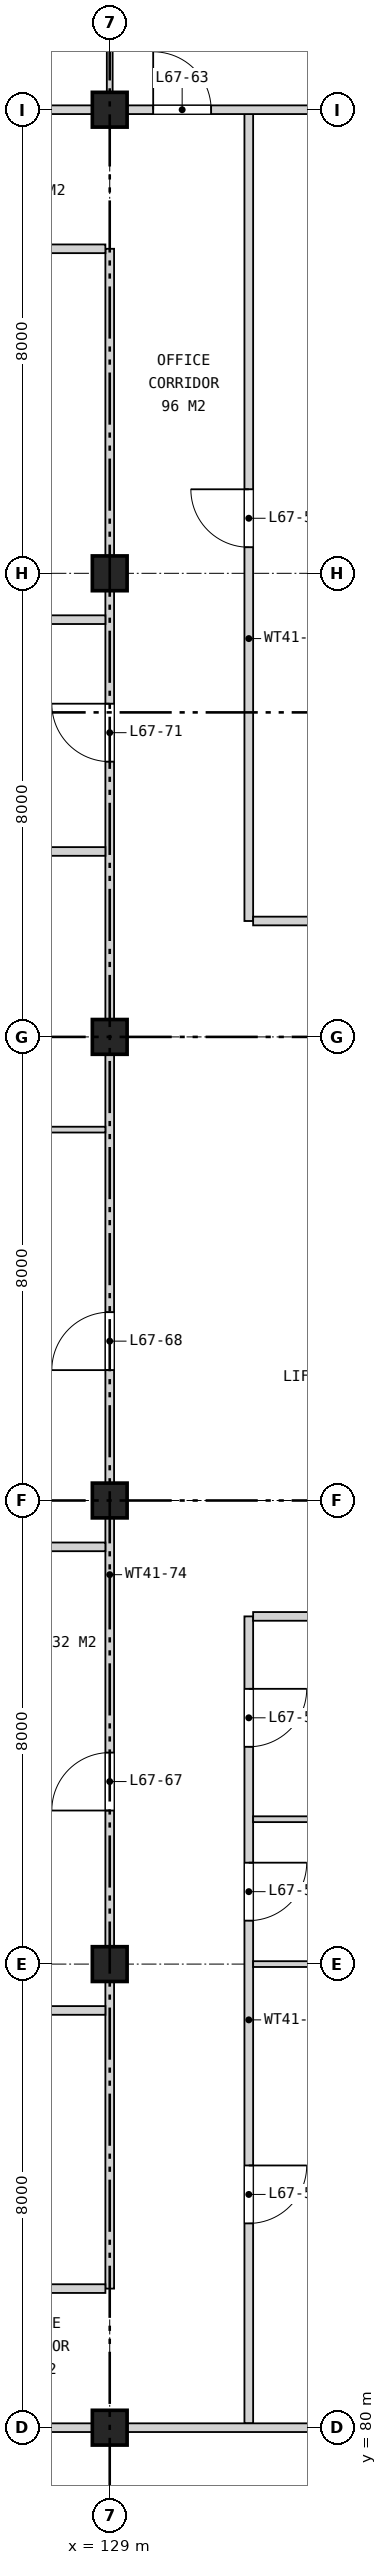
"""IFC4 building model, lengths in metres.
Left out: names, types, materials, properties, quantities, classifications, styles, units other than length and angle.
Written with IfcOpenShell. Run it as: python <this file> out.ifc"""

import sys

from ifc_helpers import new_model, si_unit, direction, frame, frame_2d, origin, origin_2d, place, context, subcontext, project, spatial, rectangle, extrude, element, fill, save


model = new_model("IFC4")
c1 = context("Model", 3, precision=1e-05, world=origin(), true_north=direction((0.0, 1.0)))
c2 = subcontext(c1, "Body", "Model", "MODEL_VIEW")
j1 = project(units=[si_unit("LENGTHUNIT", "METRE"), si_unit("PLANEANGLEUNIT", "RADIAN")], contexts=[c1])
p1 = place(None, origin())
s1 = spatial("IfcSite", under=j1, at=p1, CompositionType="ELEMENT")
p2 = place(p1, origin())
s2 = spatial("IfcBuilding", under=s1, at=p2, CompositionType="ELEMENT")
p3 = place(p2, frame((0.0, 0.0, 311.3)))
s3 = spatial("IfcBuildingStorey", under=s2, at=p3, CompositionType="ELEMENT", Elevation=311.3)
for number, where, z_axis, x_axis in (
    (1, (129.0, 80.0, 0.0), (0.0, 0.0, 1.0), (1.0, 0.0, 0.0)),
    (2, (129.0, 88.0, 0.0), (0.0, 0.0, 1.0), (1.0, 0.0, 0.0)),
    (3, (129.0, 96.0, 0.0), (0.0, 0.0, 1.0), (1.0, 0.0, 0.0)),
    (4, (129.0, 104.0, 0.0), (0.0, 0.0, 1.0), (1.0, 0.0, 0.0)),
    (5, (129.0, 112.0, 0.0), (0.0, 0.0, 1.0), (1.0, 0.0, 0.0)),
    (6, (129.0, 120.0, 0.0), (0.0, 0.0, 1.0), (1.0, 0.0, 0.0)),
):
    element("IfcColumn", number, at=place(p3, frame(where, z_axis=z_axis, x_axis=x_axis)), inside=s3, PredefinedType="COLUMN", context=c2, shape_type="SweptSolid", body=[
        extrude(rectangle(XDim=0.6, YDim=0.6, at=origin_2d()), origin(), (0.0, 0.0, 1.0), 4.2),
    ])
p4 = place(p3, frame((129.0, 82.4, 0.0), z_axis=(0.0, 0.0, 1.0), x_axis=(0.0, 1.0, 0.0)))
e7 = element("IfcWall", 7, at=p4, inside=s3, PredefinedType="PARTITIONING", context=c2, shape_type="SweptSolid", body=[
    extrude(rectangle(XDim=35.2, YDim=0.15, at=frame_2d((17.6, 0.0))), origin(), (0.0, 0.0, 1.0), 3.443),
])
p5 = place(p4, frame((8.25, 0.0, 0.0)))
e8 = element("IfcOpeningElement", 8, at=p5, cuts=e7, PredefinedType="OPENING", context=c2, shape_type="SweptSolid", body=[
    extrude(rectangle(XDim=1.0, YDim=2.1, at=frame_2d((0.5, 1.05))), frame((0.0, 0.085, 0.0), z_axis=(0.0, -1.0, 0.0), x_axis=(1.0, 0.0, 0.0)), (0.0, 0.0, 1.0), 0.17),
])
p6 = place(p4, frame((15.85, 0.0, 0.0)))
e9 = element("IfcOpeningElement", 9, at=p6, cuts=e7, PredefinedType="OPENING", context=c2, shape_type="SweptSolid", body=[
    extrude(rectangle(XDim=1.0, YDim=2.1, at=frame_2d((0.5, 1.05))), frame((0.0, 0.085, 0.0), z_axis=(0.0, -1.0, 0.0), x_axis=(1.0, 0.0, 0.0)), (0.0, 0.0, 1.0), 0.17),
])
p7 = place(p4, frame((26.35, 0.0, 0.0)))
e10 = element("IfcOpeningElement", 10, at=p7, cuts=e7, PredefinedType="OPENING", context=c2, shape_type="SweptSolid", body=[
    extrude(rectangle(XDim=1.0, YDim=2.1, at=frame_2d((0.5, 1.05))), frame((0.0, 0.085, 0.0), z_axis=(0.0, -1.0, 0.0), x_axis=(1.0, 0.0, 0.0)), (0.0, 0.0, 1.0), 0.17),
])
p8 = place(p3, frame((129.0, 120.075, 0.0), z_axis=(0.0, 0.0, 1.0), x_axis=(0.0, 1.0, 0.0)))
e11 = element("IfcWall", 11, at=p8, inside=s3, PredefinedType="PARTITIONING", context=c2, shape_type="SweptSolid", body=[
    extrude(rectangle(XDim=8.145, YDim=0.1, at=frame_2d((4.073, 0.0))), origin(), (0.0, 0.0, 1.0), 3.443),
])
p9 = place(p3, frame((131.4, 80.075, 0.0), z_axis=(0.0, 0.0, 1.0), x_axis=(0.0, 1.0, 0.0)))
e12 = element("IfcWall", 12, at=p9, inside=s3, PredefinedType="PARTITIONING", context=c2, shape_type="SweptSolid", body=[
    extrude(rectangle(XDim=13.925, YDim=0.15, at=frame_2d((6.962, 0.0))), origin(), (0.0, 0.0, 1.0), 3.443),
])
p10 = place(p9, frame((11.675, 0.0, 0.0)))
e13 = element("IfcOpeningElement", 13, at=p10, cuts=e12, PredefinedType="OPENING", context=c2, shape_type="SweptSolid", body=[
    extrude(rectangle(XDim=1.0, YDim=2.1, at=frame_2d((0.5, 1.05))), frame((0.0, 0.085, 0.0), z_axis=(0.0, -1.0, 0.0), x_axis=(1.0, 0.0, 0.0)), (0.0, 0.0, 1.0), 0.17),
])
p11 = place(p9, frame((8.675, 0.0, 0.0)))
e14 = element("IfcOpeningElement", 14, at=p11, cuts=e12, PredefinedType="OPENING", context=c2, shape_type="SweptSolid", body=[
    extrude(rectangle(XDim=1.0, YDim=2.1, at=frame_2d((0.5, 1.05))), frame((0.0, 0.085, 0.0), z_axis=(0.0, -1.0, 0.0), x_axis=(1.0, 0.0, 0.0)), (0.0, 0.0, 1.0), 0.17),
])
p12 = place(p9, frame((3.45, 0.0, 0.0)))
e15 = element("IfcOpeningElement", 15, at=p12, cuts=e12, PredefinedType="OPENING", context=c2, shape_type="SweptSolid", body=[
    extrude(rectangle(XDim=1.0, YDim=2.1, at=frame_2d((0.5, 1.05))), frame((0.0, 0.085, 0.0), z_axis=(0.0, -1.0, 0.0), x_axis=(1.0, 0.0, 0.0)), (0.0, 0.0, 1.0), 0.17),
])
p13 = place(p3, frame((131.4, 106.0, 0.0), z_axis=(0.0, 0.0, 1.0), x_axis=(0.0, 1.0, 0.0)))
e16 = element("IfcWall", 16, at=p13, inside=s3, PredefinedType="PARTITIONING", context=c2, shape_type="SweptSolid", body=[
    extrude(rectangle(XDim=13.925, YDim=0.15, at=frame_2d((6.962, 0.0))), origin(), (0.0, 0.0, 1.0), 3.443),
])
p14 = place(p13, frame((6.45, 0.0, 0.0)))
e17 = element("IfcOpeningElement", 17, at=p14, cuts=e16, PredefinedType="OPENING", context=c2, shape_type="SweptSolid", body=[
    extrude(rectangle(XDim=1.0, YDim=2.1, at=frame_2d((0.5, 1.05))), frame((0.0, 0.085, 0.0), z_axis=(0.0, -1.0, 0.0), x_axis=(1.0, 0.0, 0.0)), (0.0, 0.0, 1.0), 0.17),
])
p15 = place(p3, frame((112.78, 80.0, 0.0), z_axis=(0.0, 0.0, 1.0), x_axis=(1.0, 0.0, 0.0)))
e18 = element("IfcWall", 18, at=p15, inside=s3, PredefinedType="PARTITIONING", context=c2, shape_type="SweptSolid", body=[
    extrude(rectangle(XDim=24.44, YDim=0.15, at=frame_2d((12.22, 0.0))), origin(), (0.0, 0.0, 1.0), 3.443),
])
p16 = place(p15, frame((11.27, 0.0, 0.0)))
e19 = element("IfcOpeningElement", 19, at=p16, cuts=e18, PredefinedType="OPENING", context=c2, shape_type="SweptSolid", body=[
    extrude(rectangle(XDim=1.8, YDim=2.1, at=frame_2d((0.9, 1.05))), frame((0.0, 0.085, 0.0), z_axis=(0.0, -1.0, 0.0), x_axis=(1.0, 0.0, 0.0)), (0.0, 0.0, 1.0), 0.17),
])
p17 = place(p3, frame((121.075, 82.4, 0.0), z_axis=(0.0, 0.0, 1.0), x_axis=(1.0, 0.0, 0.0)))
e20 = element("IfcWall", 20, at=p17, inside=s3, PredefinedType="PARTITIONING", context=c2, shape_type="SweptSolid", body=[
    extrude(rectangle(XDim=7.85, YDim=0.15, at=frame_2d((3.925, 0.0))), origin(), (0.0, 0.0, 1.0), 3.443),
])
p18 = place(p17, frame((3.45, 0.0, 0.0)))
e21 = element("IfcOpeningElement", 21, at=p18, cuts=e20, PredefinedType="OPENING", context=c2, shape_type="SweptSolid", body=[
    extrude(rectangle(XDim=1.0, YDim=2.1, at=frame_2d((0.5, 1.05))), frame((0.0, 0.085, 0.0), z_axis=(0.0, -1.0, 0.0), x_axis=(1.0, 0.0, 0.0)), (0.0, 0.0, 1.0), 0.17),
])
p19 = place(p3, frame((121.075, 87.2, 0.0), z_axis=(0.0, 0.0, 1.0), x_axis=(1.0, 0.0, 0.0)))
e22 = element("IfcWall", 22, at=p19, inside=s3, PredefinedType="PARTITIONING", context=c2, shape_type="SweptSolid", body=[
    extrude(rectangle(XDim=7.85, YDim=0.15, at=frame_2d((3.925, 0.0))), origin(), (0.0, 0.0, 1.0), 3.443),
])
for number, where, z_axis, x_axis in (
    (23, (131.475, 88.0, 0.0), (0.0, 0.0, 1.0), (1.0, 0.0, 0.0)),
    (24, (131.475, 90.5, 0.0), (0.0, 0.0, 1.0), (1.0, 0.0, 0.0)),
):
    element("IfcWall", number, at=place(p3, frame(where, z_axis=z_axis, x_axis=x_axis)), inside=s3, PredefinedType="PARTITIONING", context=c2, shape_type="SweptSolid", body=[
        extrude(rectangle(XDim=5.525, YDim=0.1, at=frame_2d((2.762, 0.0))), origin(), (0.0, 0.0, 1.0), 3.443),
    ])
p20 = place(p3, frame((131.475, 94.0, 0.0), z_axis=(0.0, 0.0, 1.0), x_axis=(1.0, 0.0, 0.0)))
e25 = element("IfcWall", 25, at=p20, inside=s3, PredefinedType="PARTITIONING", context=c2, shape_type="SweptSolid", body=[
    extrude(rectangle(XDim=5.525, YDim=0.15, at=frame_2d((2.762, 0.0))), origin(), (0.0, 0.0, 1.0), 3.443),
])
p21 = place(p3, frame((121.075, 95.2, 0.0), z_axis=(0.0, 0.0, 1.0), x_axis=(1.0, 0.0, 0.0)))
e26 = element("IfcWall", 26, at=p21, inside=s3, PredefinedType="PARTITIONING", context=c2, shape_type="SweptSolid", body=[
    extrude(rectangle(XDim=7.85, YDim=0.15, at=frame_2d((3.925, 0.0))), origin(), (0.0, 0.0, 1.0), 3.443),
])
p22 = place(p3, frame((121.075, 102.4, 0.0), z_axis=(0.0, 0.0, 1.0), x_axis=(1.0, 0.0, 0.0)))
e27 = element("IfcWall", 27, at=p22, inside=s3, PredefinedType="PARTITIONING", context=c2, shape_type="SweptSolid", body=[
    extrude(rectangle(XDim=7.85, YDim=0.1, at=frame_2d((3.925, 0.0))), origin(), (0.0, 0.0, 1.0), 3.443),
])
p23 = place(p3, frame((131.475, 106.0, 0.0), z_axis=(0.0, 0.0, 1.0), x_axis=(1.0, 0.0, 0.0)))
e28 = element("IfcWall", 28, at=p23, inside=s3, PredefinedType="PARTITIONING", context=c2, shape_type="SweptSolid", body=[
    extrude(rectangle(XDim=5.525, YDim=0.15, at=frame_2d((2.762, 0.0))), origin(), (0.0, 0.0, 1.0), 3.443),
])
for number, where, z_axis, x_axis in (
    (29, (121.075, 107.2, 0.0), (0.0, 0.0, 1.0), (1.0, 0.0, 0.0)),
    (30, (121.075, 111.2, 0.0), (0.0, 0.0, 1.0), (1.0, 0.0, 0.0)),
):
    element("IfcWall", number, at=place(p3, frame(where, z_axis=z_axis, x_axis=x_axis)), inside=s3, PredefinedType="PARTITIONING", context=c2, shape_type="SweptSolid", body=[
        extrude(rectangle(XDim=7.85, YDim=0.15, at=frame_2d((3.925, 0.0))), origin(), (0.0, 0.0, 1.0), 3.443),
    ])
p24 = place(p3, frame((121.075, 117.6, 0.0), z_axis=(0.0, 0.0, 1.0), x_axis=(1.0, 0.0, 0.0)))
e31 = element("IfcWall", 31, at=p24, inside=s3, PredefinedType="PARTITIONING", context=c2, shape_type="SweptSolid", body=[
    extrude(rectangle(XDim=7.85, YDim=0.15, at=frame_2d((3.925, 0.0))), origin(), (0.0, 0.0, 1.0), 3.443),
])
p25 = place(p24, frame((3.45, 0.0, 0.0)))
e32 = element("IfcOpeningElement", 32, at=p25, cuts=e31, PredefinedType="OPENING", context=c2, shape_type="SweptSolid", body=[
    extrude(rectangle(XDim=1.0, YDim=2.1, at=frame_2d((0.5, 1.05))), frame((0.0, 0.085, 0.0), z_axis=(0.0, -1.0, 0.0), x_axis=(1.0, 0.0, 0.0)), (0.0, 0.0, 1.0), 0.17),
])
p26 = place(p3, frame((112.78, 120.0, 0.0), z_axis=(0.0, 0.0, 1.0), x_axis=(1.0, 0.0, 0.0)))
e33 = element("IfcWall", 33, at=p26, inside=s3, PredefinedType="PARTITIONING", context=c2, shape_type="SweptSolid", body=[
    extrude(rectangle(XDim=24.44, YDim=0.15, at=frame_2d((12.22, 0.0))), origin(), (0.0, 0.0, 1.0), 3.443),
])
p27 = place(p26, frame((6.47, 0.0, 0.0)))
e34 = element("IfcOpeningElement", 34, at=p27, cuts=e33, PredefinedType="OPENING", context=c2, shape_type="SweptSolid", body=[
    extrude(rectangle(XDim=1.0, YDim=2.1, at=frame_2d((0.5, 1.05))), frame((0.0, 0.085, 0.0), z_axis=(0.0, -1.0, 0.0), x_axis=(1.0, 0.0, 0.0)), (0.0, 0.0, 1.0), 0.17),
])
p28 = place(p26, frame((11.67, 0.0, 0.0)))
e35 = element("IfcOpeningElement", 35, at=p28, cuts=e33, PredefinedType="OPENING", context=c2, shape_type="SweptSolid", body=[
    extrude(rectangle(XDim=1.0, YDim=2.1, at=frame_2d((0.5, 1.05))), frame((0.0, 0.085, 0.0), z_axis=(0.0, -1.0, 0.0), x_axis=(1.0, 0.0, 0.0)), (0.0, 0.0, 1.0), 0.17),
])
p29 = place(p26, frame((16.97, 0.0, 0.0)))
e36 = element("IfcOpeningElement", 36, at=p29, cuts=e33, PredefinedType="OPENING", context=c2, shape_type="SweptSolid", body=[
    extrude(rectangle(XDim=1.0, YDim=2.1, at=frame_2d((0.5, 1.05))), frame((0.0, 0.085, 0.0), z_axis=(0.0, -1.0, 0.0), x_axis=(1.0, 0.0, 0.0)), (0.0, 0.0, 1.0), 0.17),
])
p30 = place(p14, origin())
e37 = element("IfcDoor", 37, at=p30, inside=s3, OperationType="SINGLE_SWING_RIGHT", PredefinedType="DOOR", context=c2, shape_type="SweptSolid", body=[
    extrude(rectangle(XDim=1.0, YDim=2.1, at=frame_2d((0.5, 1.05))), frame((0.0, 0.025, 0.0), z_axis=(0.0, -1.0, 0.0), x_axis=(1.0, 0.0, 0.0)), (0.0, 0.0, 1.0), 0.05),
])
fill(e17, e37)
p31 = place(p10, frame((1.0, 0.0, 0.0), z_axis=(0.0, 0.0, 1.0), x_axis=(-1.0, 0.0, 0.0)))
e38 = element("IfcDoor", 38, at=p31, inside=s3, OperationType="SINGLE_SWING_LEFT", PredefinedType="DOOR", context=c2, shape_type="SweptSolid", body=[
    extrude(rectangle(XDim=1.0, YDim=2.1, at=frame_2d((0.5, 1.05))), frame((0.0, 0.025, 0.0), z_axis=(0.0, -1.0, 0.0), x_axis=(1.0, 0.0, 0.0)), (0.0, 0.0, 1.0), 0.05),
])
fill(e13, e38)
p32 = place(p11, frame((1.0, 0.0, 0.0), z_axis=(0.0, 0.0, 1.0), x_axis=(-1.0, 0.0, 0.0)))
e39 = element("IfcDoor", 39, at=p32, inside=s3, OperationType="SINGLE_SWING_LEFT", PredefinedType="DOOR", context=c2, shape_type="SweptSolid", body=[
    extrude(rectangle(XDim=1.0, YDim=2.1, at=frame_2d((0.5, 1.05))), frame((0.0, 0.025, 0.0), z_axis=(0.0, -1.0, 0.0), x_axis=(1.0, 0.0, 0.0)), (0.0, 0.0, 1.0), 0.05),
])
fill(e14, e39)
p33 = place(p12, frame((1.0, 0.0, 0.0), z_axis=(0.0, 0.0, 1.0), x_axis=(-1.0, 0.0, 0.0)))
e40 = element("IfcDoor", 40, at=p33, inside=s3, OperationType="SINGLE_SWING_LEFT", PredefinedType="DOOR", context=c2, shape_type="SweptSolid", body=[
    extrude(rectangle(XDim=1.0, YDim=2.1, at=frame_2d((0.5, 1.05))), frame((0.0, 0.025, 0.0), z_axis=(0.0, -1.0, 0.0), x_axis=(1.0, 0.0, 0.0)), (0.0, 0.0, 1.0), 0.05),
])
fill(e15, e40)
p34 = place(p29, origin())
e41 = element("IfcDoor", 41, at=p34, inside=s3, OperationType="SINGLE_SWING_LEFT", PredefinedType="DOOR", context=c2, shape_type="SweptSolid", body=[
    extrude(rectangle(XDim=1.0, YDim=2.1, at=frame_2d((0.5, 1.05))), frame((0.0, 0.025, 0.0), z_axis=(0.0, -1.0, 0.0), x_axis=(1.0, 0.0, 0.0)), (0.0, 0.0, 1.0), 0.05),
])
fill(e36, e41)
p35 = place(p5, origin())
e42 = element("IfcDoor", 42, at=p35, inside=s3, OperationType="SINGLE_SWING_LEFT", PredefinedType="DOOR", context=c2, shape_type="SweptSolid", body=[
    extrude(rectangle(XDim=1.0, YDim=2.1, at=frame_2d((0.5, 1.05))), frame((0.0, 0.025, 0.0), z_axis=(0.0, -1.0, 0.0), x_axis=(1.0, 0.0, 0.0)), (0.0, 0.0, 1.0), 0.05),
])
fill(e8, e42)
p36 = place(p6, origin())
e43 = element("IfcDoor", 43, at=p36, inside=s3, OperationType="SINGLE_SWING_LEFT", PredefinedType="DOOR", context=c2, shape_type="SweptSolid", body=[
    extrude(rectangle(XDim=1.0, YDim=2.1, at=frame_2d((0.5, 1.05))), frame((0.0, 0.025, 0.0), z_axis=(0.0, -1.0, 0.0), x_axis=(1.0, 0.0, 0.0)), (0.0, 0.0, 1.0), 0.05),
])
fill(e9, e43)
p37 = place(p7, origin())
e44 = element("IfcDoor", 44, at=p37, inside=s3, OperationType="SINGLE_SWING_RIGHT", PredefinedType="DOOR", context=c2, shape_type="SweptSolid", body=[
    extrude(rectangle(XDim=1.0, YDim=2.1, at=frame_2d((0.5, 1.05))), frame((0.0, 0.025, 0.0), z_axis=(0.0, -1.0, 0.0), x_axis=(1.0, 0.0, 0.0)), (0.0, 0.0, 1.0), 0.05),
])
fill(e10, e44)
save(model, sys.argv[1])
